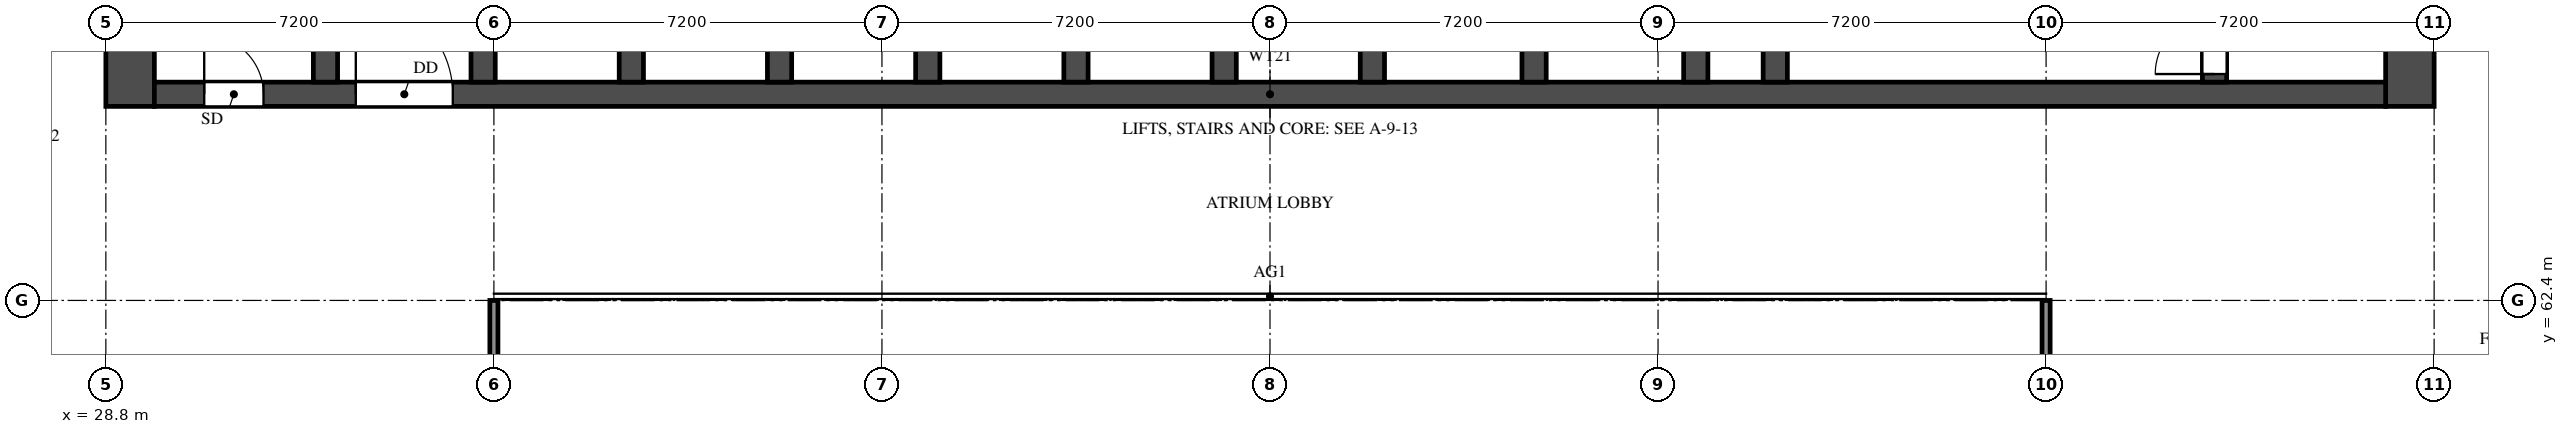
"""IFC4 building model, lengths in metres.
Left out: names, types, materials, properties, quantities, classifications, styles, units other than length and angle.
Written with IfcOpenShell. Run it as: python <this file> out.ifc"""

import sys

from ifc_helpers import new_model, si_unit, direction, frame, frame_2d, origin, place, context, subcontext, project, spatial, rectangle, extrude, element, fill, save


model = new_model("IFC4")
c1 = context("Model", 3, precision=1e-05, world=origin(), true_north=direction((0.0, 1.0)))
c2 = subcontext(c1, "Body", "Model", "MODEL_VIEW")
j1 = project(units=[si_unit("LENGTHUNIT", "METRE"), si_unit("PLANEANGLEUNIT", "RADIAN")], contexts=[c1])
p1 = place(None, origin())
s1 = spatial("IfcSite", under=j1, at=p1, CompositionType="ELEMENT")
p2 = place(p1, origin())
s2 = spatial("IfcBuilding", under=s1, at=p2, CompositionType="ELEMENT")
p3 = place(p2, frame((0.0, 0.0, 86.5)))
s3 = spatial("IfcBuildingStorey", under=s2, at=p3, CompositionType="ELEMENT", Elevation=86.5)
for number, where, z_axis, x_axis in (
    (1, (29.25, 66.0, 0.0), (0.0, 0.0, 1.0), (0.0, 1.0, 0.0)),
    (2, (71.55, 66.0, 0.0), (0.0, 0.0, 1.0), (0.0, 1.0, 0.0)),
):
    element("IfcWall", number, at=place(p3, frame(where, z_axis=z_axis, x_axis=x_axis)), inside=s3, PredefinedType="SHEAR", context=c2, shape_type="SweptSolid", body=[
        extrude(rectangle(XDim=12.0, YDim=0.9, at=frame_2d((6.0, 0.0))), origin(), (0.0, 0.0, 1.0), 3.18),
    ])
p4 = place(p3, frame((29.7, 66.225, 0.0), z_axis=(0.0, 0.0, 1.0), x_axis=(1.0, 0.0, 0.0)))
e3 = element("IfcWall", 3, at=p4, inside=s3, PredefinedType="SHEAR", context=c2, shape_type="SweptSolid", body=[
    extrude(rectangle(XDim=41.4, YDim=0.45, at=frame_2d((20.7, 0.0))), origin(), (0.0, 0.0, 1.0), 3.18),
])
p5 = place(p4, frame((0.925, 0.0, 0.0)))
e4 = element("IfcOpeningElement", 4, at=p5, cuts=e3, PredefinedType="OPENING", context=c2, shape_type="SweptSolid", body=[
    extrude(rectangle(XDim=1.1, YDim=2.1, at=frame_2d((0.55, 1.05))), frame((0.0, 0.235, 0.0), z_axis=(0.0, -1.0, 0.0), x_axis=(1.0, 0.0, 0.0)), (0.0, 0.0, 1.0), 0.47),
])
p6 = place(p4, frame((3.738, 0.0, 0.0)))
e5 = element("IfcOpeningElement", 5, at=p6, cuts=e3, PredefinedType="OPENING", context=c2, shape_type="SweptSolid", body=[
    extrude(rectangle(XDim=1.8, YDim=2.1, at=frame_2d((0.9, 1.05))), frame((0.0, 0.235, 0.0), z_axis=(0.0, -1.0, 0.0), x_axis=(1.0, 0.0, 0.0)), (0.0, 0.0, 1.0), 0.47),
])
p7 = place(p3, frame((32.875, 66.45, 0.0), z_axis=(0.0, 0.0, 1.0), x_axis=(0.0, 1.0, 0.0)))
e6 = element("IfcWall", 6, at=p7, inside=s3, PredefinedType="SHEAR", context=c2, shape_type="SweptSolid", body=[
    extrude(rectangle(XDim=10.65, YDim=0.45, at=frame_2d((5.325, 0.0))), origin(), (0.0, 0.0, 1.0), 3.18),
])
p8 = place(p3, frame((67.925, 66.45, 0.0), z_axis=(0.0, 0.0, 1.0), x_axis=(0.0, 1.0, 0.0)))
e7 = element("IfcWall", 7, at=p8, inside=s3, PredefinedType="SHEAR", context=c2, shape_type="SweptSolid", body=[
    extrude(rectangle(XDim=10.65, YDim=0.45, at=frame_2d((5.325, 0.0))), origin(), (0.0, 0.0, 1.0), 3.18),
])
p9 = place(p8, frame((0.15, 0.0, 0.0)))
e8 = element("IfcOpeningElement", 8, at=p9, cuts=e7, PredefinedType="OPENING", context=c2, shape_type="SweptSolid", body=[
    extrude(rectangle(XDim=1.1, YDim=2.1, at=frame_2d((0.55, 1.05))), frame((0.0, 0.235, 0.0), z_axis=(0.0, -1.0, 0.0), x_axis=(1.0, 0.0, 0.0)), (0.0, 0.0, 1.0), 0.47),
])
p10 = place(p3, frame((59.775, 66.45, 0.0), z_axis=(0.0, 0.0, 1.0), x_axis=(0.0, 1.0, 0.0)))
e9 = element("IfcWall", 9, at=p10, inside=s3, PredefinedType="SHEAR", context=c2, shape_type="SweptSolid", body=[
    extrude(rectangle(XDim=6.025, YDim=0.45, at=frame_2d((3.013, 0.0))), origin(), (0.0, 0.0, 1.0), 3.18),
])
p11 = place(p10, frame((3.85, 0.0, 0.0)))
e10 = element("IfcOpeningElement", 10, at=p11, cuts=e9, PredefinedType="OPENING", context=c2, shape_type="SweptSolid", body=[
    extrude(rectangle(XDim=1.2, YDim=2.1, at=frame_2d((0.6, 1.05))), frame((0.0, 0.235, 0.0), z_axis=(0.0, -1.0, 0.0), x_axis=(1.0, 0.0, 0.0)), (0.0, 0.0, 1.0), 0.47),
])
for number, where, z_axis, x_axis in (
    (11, (35.8, 66.45, 0.0), (0.0, 0.0, 1.0), (0.0, 1.0, 0.0)),
    (12, (38.55, 66.45, 0.0), (0.0, 0.0, 1.0), (0.0, 1.0, 0.0)),
    (13, (41.3, 66.45, 0.0), (0.0, 0.0, 1.0), (0.0, 1.0, 0.0)),
    (14, (44.05, 66.45, 0.0), (0.0, 0.0, 1.0), (0.0, 1.0, 0.0)),
    (15, (46.8, 66.45, 0.0), (0.0, 0.0, 1.0), (0.0, 1.0, 0.0)),
    (16, (49.55, 66.45, 0.0), (0.0, 0.0, 1.0), (0.0, 1.0, 0.0)),
    (17, (52.3, 66.45, 0.0), (0.0, 0.0, 1.0), (0.0, 1.0, 0.0)),
    (18, (55.3, 66.45, 0.0), (0.0, 0.0, 1.0), (0.0, 1.0, 0.0)),
    (19, (58.3, 66.45, 0.0), (0.0, 0.0, 1.0), (0.0, 1.0, 0.0)),
):
    element("IfcWall", number, at=place(p3, frame(where, z_axis=z_axis, x_axis=x_axis)), inside=s3, PredefinedType="SHEAR", context=c2, shape_type="SweptSolid", body=[
        extrude(rectangle(XDim=2.425, YDim=0.45, at=frame_2d((1.212, 0.0))), origin(), (0.0, 0.0, 1.0), 3.18),
    ])
for number, where, z_axis, x_axis in (
    (20, (36.0, 48.0, 0.0), (0.0, 0.0, 1.0), (0.0, 1.0, 0.0)),
    (21, (64.8, 48.0, 0.0), (0.0, 0.0, 1.0), (0.0, 1.0, 0.0)),
):
    element("IfcWall", number, at=place(p3, frame(where, z_axis=z_axis, x_axis=x_axis)), inside=s3, PredefinedType="SOLIDWALL", context=c2, shape_type="SweptSolid", body=[
        extrude(rectangle(XDim=14.4, YDim=0.15, at=frame_2d((7.2, 0.0))), origin(), (0.0, 0.0, 1.0), 2.28),
    ])
p12 = place(p5, origin())
e22 = element("IfcDoor", 22, at=p12, inside=s3, OperationType="SINGLE_SWING_LEFT", PredefinedType="DOOR", context=c2, shape_type="SweptSolid", body=[
    extrude(rectangle(XDim=1.1, YDim=2.1, at=frame_2d((0.55, 1.05))), frame((0.0, 0.025, 0.0), z_axis=(0.0, -1.0, 0.0), x_axis=(1.0, 0.0, 0.0)), (0.0, 0.0, 1.0), 0.05),
])
fill(e4, e22)
p13 = place(p9, origin())
e23 = element("IfcDoor", 23, at=p13, inside=s3, OperationType="SINGLE_SWING_LEFT", PredefinedType="DOOR", context=c2, shape_type="SweptSolid", body=[
    extrude(rectangle(XDim=1.1, YDim=2.1, at=frame_2d((0.55, 1.05))), frame((0.0, 0.025, 0.0), z_axis=(0.0, -1.0, 0.0), x_axis=(1.0, 0.0, 0.0)), (0.0, 0.0, 1.0), 0.05),
])
fill(e8, e23)
p14 = place(p6, origin())
e24 = element("IfcDoor", 24, at=p14, inside=s3, OperationType="DOUBLE_DOOR_SINGLE_SWING", PredefinedType="DOOR", context=c2, shape_type="SweptSolid", body=[
    extrude(rectangle(XDim=1.8, YDim=2.1, at=frame_2d((0.9, 1.05))), frame((0.0, 0.025, 0.0), z_axis=(0.0, -1.0, 0.0), x_axis=(1.0, 0.0, 0.0)), (0.0, 0.0, 1.0), 0.05),
])
fill(e5, e24)
save(model, sys.argv[1])
